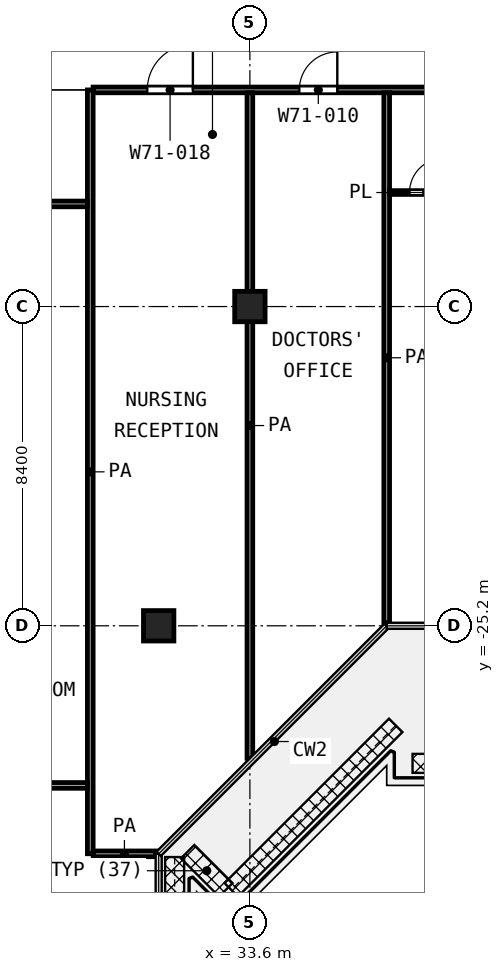
"""IFC4 building model, lengths in metres.
Left out: names, types, materials, properties, quantities, classifications, styles, units other than length and angle.
Written with IfcOpenShell. Run it as: python <this file> out.ifc"""

import sys

from ifc_helpers import new_model, si_unit, direction, frame, frame_2d, origin, origin_2d, place, context, subcontext, project, spatial, rectangle, extrude, element, fill, save


model = new_model("IFC4")
c1 = context("Model", 3, precision=1e-05, world=origin(), true_north=direction((0.0, 1.0)))
c2 = subcontext(c1, "Body", "Model", "MODEL_VIEW")
j1 = project(units=[si_unit("LENGTHUNIT", "METRE"), si_unit("PLANEANGLEUNIT", "RADIAN")], contexts=[c1])
p1 = place(None, origin())
s1 = spatial("IfcSite", under=j1, at=p1, CompositionType="ELEMENT")
p2 = place(p1, origin())
s2 = spatial("IfcBuilding", under=s1, at=p2, CompositionType="ELEMENT")
p3 = place(p2, frame((0.0, 0.0, 328.0)))
s3 = spatial("IfcBuildingStorey", under=s2, at=p3, CompositionType="ELEMENT", Elevation=328.0)
for number, where, z_axis, x_axis in (
    (1, (33.6, -16.8, 0.0), (0.0, 0.0, 1.0), (1.0, 0.0, 0.0)),
    (2, (31.2, -25.2, 0.0), (0.0, 0.0, 1.0), (1.0, 0.0, 0.0)),
):
    element("IfcColumn", number, at=place(p3, frame(where, z_axis=z_axis, x_axis=x_axis)), inside=s3, PredefinedType="COLUMN", context=c2, shape_type="SweptSolid", body=[
        extrude(rectangle(XDim=0.8, YDim=0.8, at=origin_2d()), origin(), (0.0, 0.0, 1.0), 4.2),
    ])
p4 = place(p3, frame((37.275, -13.8, 0.0), z_axis=(0.0, 0.0, 1.0), x_axis=(1.0, 0.0, 0.0)))
e3 = element("IfcWall", 3, at=p4, inside=s3, PredefinedType="PARTITIONING", context=c2, shape_type="SweptSolid", body=[
    extrude(rectangle(XDim=1.975, YDim=0.1, at=frame_2d((0.988, 0.0))), origin(), (0.0, 0.0, 1.0), 3.78),
])
p5 = place(p4, frame((0.525, 0.0, 0.0)))
e4 = element("IfcOpeningElement", 4, at=p5, cuts=e3, PredefinedType="OPENING", context=c2, shape_type="SweptSolid", body=[
    extrude(rectangle(XDim=0.9, YDim=2.1, at=frame_2d((0.45, 1.05))), frame((0.0, 0.06, 0.0), z_axis=(0.0, -1.0, 0.0), x_axis=(1.0, 0.0, 0.0)), (0.0, 0.0, 1.0), 0.12),
])
p6 = place(p3, frame((29.477, -31.2, 0.0), z_axis=(0.0, 0.0, 1.0), x_axis=(1.0, 0.0, 0.0)))
e5 = element("IfcWall", 5, at=p6, inside=s3, PredefinedType="PARTITIONING", context=c2, shape_type="SweptSolid", body=[
    extrude(rectangle(XDim=1.643, YDim=0.15, at=frame_2d((0.822, 0.0))), origin(), (0.0, 0.0, 1.0), 3.78),
])
p7 = place(p3, frame((11.175, -29.4, 0.0), z_axis=(0.0, 0.0, 1.0), x_axis=(1.0, 0.0, 0.0)))
e6 = element("IfcWall", 6, at=p7, inside=s3, PredefinedType="PARTITIONING", context=c2, shape_type="SweptSolid", body=[
    extrude(rectangle(XDim=18.15, YDim=0.15, at=frame_2d((9.075, 0.0))), origin(), (0.0, 0.0, 1.0), 3.78),
])
p8 = place(p3, frame((24.7, -14.1, 0.0), z_axis=(0.0, 0.0, 1.0), x_axis=(1.0, 0.0, 0.0)))
e7 = element("IfcWall", 7, at=p8, inside=s3, PredefinedType="PARTITIONING", context=c2, shape_type="SweptSolid", body=[
    extrude(rectangle(XDim=4.625, YDim=0.15, at=frame_2d((2.312, 0.0))), origin(), (0.0, 0.0, 1.0), 3.78),
])
p9 = place(p8, frame((1.85, 0.0, 0.0)))
e8 = element("IfcOpeningElement", 8, at=p9, cuts=e7, PredefinedType="OPENING", context=c2, shape_type="SweptSolid", body=[
    extrude(rectangle(XDim=1.5, YDim=2.1, at=frame_2d((0.75, 1.05))), frame((0.0, 0.085, 0.0), z_axis=(0.0, -1.0, 0.0), x_axis=(1.0, 0.0, 0.0)), (0.0, 0.0, 1.0), 0.17),
])
p10 = place(p3, frame((29.475, -11.1, 0.0), z_axis=(0.0, 0.0, 1.0), x_axis=(1.0, 0.0, 0.0)))
e9 = element("IfcWall", 9, at=p10, inside=s3, PredefinedType="PARTITIONING", context=c2, shape_type="SweptSolid", body=[
    extrude(rectangle(XDim=29.245, YDim=0.15, at=frame_2d((14.623, 0.0))), origin(), (0.0, 0.0, 1.0), 3.78),
])
p11 = place(p10, frame((1.425, 0.0, 0.0)))
e10 = element("IfcOpeningElement", 10, at=p11, cuts=e9, PredefinedType="OPENING", context=c2, shape_type="SweptSolid", body=[
    extrude(rectangle(XDim=1.2, YDim=2.1, at=frame_2d((0.6, 1.05))), frame((0.0, 0.085, 0.0), z_axis=(0.0, -1.0, 0.0), x_axis=(1.0, 0.0, 0.0)), (0.0, 0.0, 1.0), 0.17),
])
p12 = place(p10, frame((5.425, 0.0, 0.0)))
e11 = element("IfcOpeningElement", 11, at=p12, cuts=e9, PredefinedType="OPENING", context=c2, shape_type="SweptSolid", body=[
    extrude(rectangle(XDim=1.0, YDim=2.1, at=frame_2d((0.5, 1.05))), frame((0.0, 0.085, 0.0), z_axis=(0.0, -1.0, 0.0), x_axis=(1.0, 0.0, 0.0)), (0.0, 0.0, 1.0), 0.17),
])
p13 = place(p10, frame((13.825, 0.0, 0.0)))
e12 = element("IfcOpeningElement", 12, at=p13, cuts=e9, PredefinedType="OPENING", context=c2, shape_type="SweptSolid", body=[
    extrude(rectangle(XDim=1.2, YDim=2.1, at=frame_2d((0.6, 1.05))), frame((0.0, 0.085, 0.0), z_axis=(0.0, -1.0, 0.0), x_axis=(1.0, 0.0, 0.0)), (0.0, 0.0, 1.0), 0.17),
])
p14 = place(p10, frame((11.525, 0.0, 0.0)))
e13 = element("IfcOpeningElement", 13, at=p14, cuts=e9, PredefinedType="OPENING", context=c2, shape_type="SweptSolid", body=[
    extrude(rectangle(XDim=1.2, YDim=2.1, at=frame_2d((0.6, 1.05))), frame((0.0, 0.085, 0.0), z_axis=(0.0, -1.0, 0.0), x_axis=(1.0, 0.0, 0.0)), (0.0, 0.0, 1.0), 0.17),
])
p15 = place(p10, frame((18.325, 0.0, 0.0)))
e14 = element("IfcOpeningElement", 14, at=p15, cuts=e9, PredefinedType="OPENING", context=c2, shape_type="SweptSolid", body=[
    extrude(rectangle(XDim=1.0, YDim=2.1, at=frame_2d((0.5, 1.05))), frame((0.0, 0.085, 0.0), z_axis=(0.0, -1.0, 0.0), x_axis=(1.0, 0.0, 0.0)), (0.0, 0.0, 1.0), 0.17),
])
p16 = place(p10, frame((24.375, 0.0, 0.0)))
e15 = element("IfcOpeningElement", 15, at=p16, cuts=e9, PredefinedType="OPENING", context=c2, shape_type="SweptSolid", body=[
    extrude(rectangle(XDim=1.5, YDim=2.1, at=frame_2d((0.75, 1.05))), frame((0.0, 0.085, 0.0), z_axis=(0.0, -1.0, 0.0), x_axis=(1.0, 0.0, 0.0)), (0.0, 0.0, 1.0), 0.17),
])
p17 = place(p3, frame((29.4, -31.198, 0.0), z_axis=(0.0, 0.0, 1.0), x_axis=(0.0, 1.0, 0.0)))
e16 = element("IfcWall", 16, at=p17, inside=s3, PredefinedType="PARTITIONING", context=c2, shape_type="SweptSolid", body=[
    extrude(rectangle(XDim=20.098, YDim=0.15, at=frame_2d((10.049, 0.0))), origin(), (0.0, 0.0, 1.0), 3.78),
])
p18 = place(p3, frame((33.6, -28.687, 0.0), z_axis=(0.0, 0.0, 1.0), x_axis=(0.0, 1.0, 0.0)))
e17 = element("IfcWall", 17, at=p18, inside=s3, PredefinedType="PARTITIONING", context=c2, shape_type="SweptSolid", body=[
    extrude(rectangle(XDim=17.512, YDim=0.15, at=frame_2d((8.756, 0.0))), origin(), (0.0, 0.0, 1.0), 3.78),
])
p19 = place(p3, frame((37.2, -25.12, 0.0), z_axis=(0.0, 0.0, 1.0), x_axis=(0.0, 1.0, 0.0)))
e18 = element("IfcWall", 18, at=p19, inside=s3, PredefinedType="PARTITIONING", context=c2, shape_type="SweptSolid", body=[
    extrude(rectangle(XDim=13.945, YDim=0.15, at=frame_2d((6.973, 0.0))), origin(), (0.0, 0.0, 1.0), 3.78),
])
p20 = place(p11, origin())
e19 = element("IfcDoor", 19, at=p20, inside=s3, OperationType="SINGLE_SWING_RIGHT", PredefinedType="DOOR", context=c2, shape_type="SweptSolid", body=[
    extrude(rectangle(XDim=1.2, YDim=2.1, at=frame_2d((0.6, 1.05))), frame((0.0, 0.025, 0.0), z_axis=(0.0, -1.0, 0.0), x_axis=(1.0, 0.0, 0.0)), (0.0, 0.0, 1.0), 0.05),
])
fill(e10, e19)
p21 = place(p12, origin())
e20 = element("IfcDoor", 20, at=p21, inside=s3, OperationType="SINGLE_SWING_RIGHT", PredefinedType="DOOR", context=c2, shape_type="SweptSolid", body=[
    extrude(rectangle(XDim=1.0, YDim=2.1, at=frame_2d((0.5, 1.05))), frame((0.0, 0.025, 0.0), z_axis=(0.0, -1.0, 0.0), x_axis=(1.0, 0.0, 0.0)), (0.0, 0.0, 1.0), 0.05),
])
fill(e11, e20)
p22 = place(p5, origin())
e21 = element("IfcDoor", 21, at=p22, inside=s3, OperationType="SINGLE_SWING_RIGHT", PredefinedType="DOOR", context=c2, shape_type="SweptSolid", body=[
    extrude(rectangle(XDim=0.9, YDim=2.1, at=frame_2d((0.45, 1.05))), frame((0.0, 0.025, 0.0), z_axis=(0.0, -1.0, 0.0), x_axis=(1.0, 0.0, 0.0)), (0.0, 0.0, 1.0), 0.05),
])
fill(e4, e21)
save(model, sys.argv[1])
